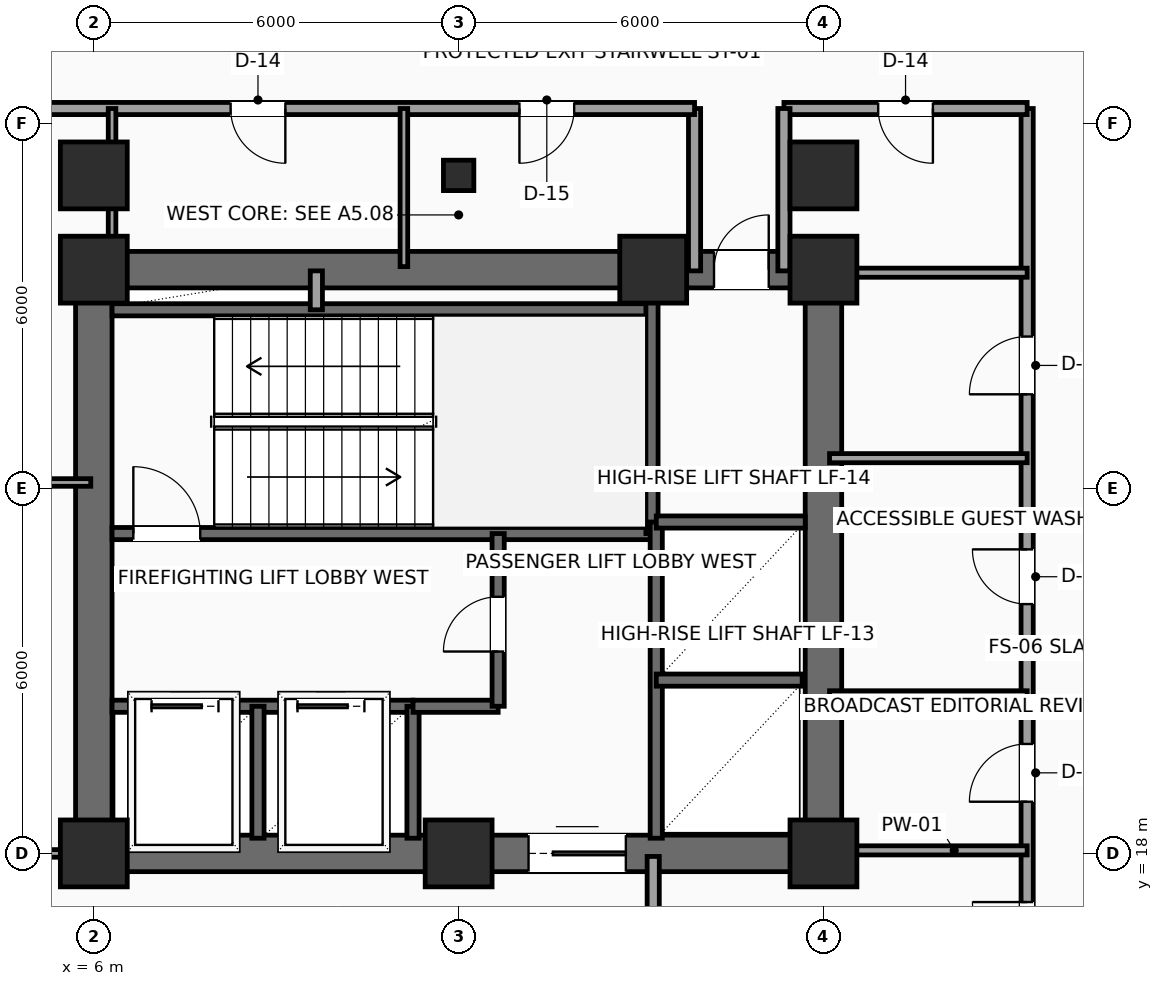
"""IFC4 building model, lengths in metres.
Left out: names, types, materials, properties, quantities, classifications, styles, units other than length and angle.
Written with IfcOpenShell. Run it as: python <this file> out.ifc"""

import sys

from ifc_helpers import new_model, si_unit, direction, frame, frame_2d, origin, origin_2d, place, context, subcontext, project, spatial, rectangle, hollow_rectangle, extrude, element, fill, save


model = new_model("IFC4")
c1 = context("Model", 3, precision=1e-05, world=origin(), true_north=direction((0.0, 1.0)))
c2 = subcontext(c1, "Body", "Model", "MODEL_VIEW")
j1 = project(units=[si_unit("LENGTHUNIT", "METRE"), si_unit("PLANEANGLEUNIT", "RADIAN")], contexts=[c1])
p1 = place(None, origin())
s1 = spatial("IfcSite", under=j1, at=p1, CompositionType="ELEMENT")
p2 = place(p1, origin())
s2 = spatial("IfcBuilding", under=s1, at=p2, CompositionType="ELEMENT")
p3 = place(p2, frame((0.0, 0.0, 153.15)))
s3 = spatial("IfcBuildingStorey", under=s2, at=p3, CompositionType="ELEMENT", Elevation=153.15)
for number, where, z_axis, x_axis in (
    (1, (6.0, 18.0, 0.0), (0.0, 0.0, 1.0), (1.0, 0.0, 0.0)),
    (2, (12.0, 18.0, 0.0), (0.0, 0.0, 1.0), (1.0, 0.0, 0.0)),
    (3, (18.0, 18.0, 0.0), (0.0, 0.0, 1.0), (1.0, 0.0, 0.0)),
    (4, (6.0, 27.6, 0.0), (0.0, 0.0, 1.0), (1.0, 0.0, 0.0)),
    (5, (15.2, 27.6, 0.0), (0.0, 0.0, 1.0), (1.0, 0.0, 0.0)),
    (6, (18.0, 27.6, 0.0), (0.0, 0.0, 1.0), (1.0, 0.0, 0.0)),
    (7, (6.0, 29.15, 0.0), (0.0, 0.0, 1.0), (1.0, 0.0, 0.0)),
):
    element("IfcColumn", number, at=place(p3, frame(where, z_axis=z_axis, x_axis=x_axis)), inside=s3, PredefinedType="COLUMN", context=c2, shape_type="SweptSolid", body=[
        extrude(rectangle(XDim=1.1, YDim=1.1, at=origin_2d()), origin(), (0.0, 0.0, 1.0), 3.75),
    ])
p4 = place(p3, frame((12.0, 29.15, 0.0), z_axis=(0.0, 0.0, 1.0), x_axis=(1.0, 0.0, 0.0)))
e8 = element("IfcColumn", 8, at=p4, inside=s3, PredefinedType="COLUMN", context=c2, shape_type="SweptSolid", body=[
    extrude(hollow_rectangle(XDim=0.5, YDim=0.5, WallThickness=0.025, InnerFilletRadius=0.025, OuterFilletRadius=0.04, at=origin_2d()), origin(), (0.0, 0.0, 1.0), 3.75),
])
p5 = place(p3, frame((18.0, 29.15, 0.0), z_axis=(0.0, 0.0, 1.0), x_axis=(1.0, 0.0, 0.0)))
e9 = element("IfcColumn", 9, at=p5, inside=s3, PredefinedType="COLUMN", context=c2, shape_type="SweptSolid", body=[
    extrude(rectangle(XDim=1.1, YDim=1.1, at=origin_2d()), origin(), (0.0, 0.0, 1.0), 3.75),
])
p6 = place(p3, frame((6.0, 18.0, 0.0), z_axis=(0.0, 0.0, 1.0), x_axis=(1.0, 0.0, 0.0)))
e10 = element("IfcWall", 10, at=p6, inside=s3, PredefinedType="SHEAR", context=c2, shape_type="SweptSolid", body=[
    extrude(rectangle(XDim=12.0, YDim=0.6, at=frame_2d((6.0, 0.0))), origin(), (0.0, 0.0, 1.0), 3.525),
])
p7 = place(p6, frame((7.15, 0.0, 0.0)))
e11 = element("IfcOpeningElement", 11, at=p7, cuts=e10, PredefinedType="OPENING", context=c2, shape_type="SweptSolid", body=[
    extrude(rectangle(XDim=1.6, YDim=2.3, at=frame_2d((0.8, 1.15))), frame((0.0, 0.31, 0.0), z_axis=(0.0, -1.0, 0.0), x_axis=(1.0, 0.0, 0.0)), (0.0, 0.0, 1.0), 0.62),
])
p8 = place(p3, frame((6.0, 27.6, 0.0), z_axis=(0.0, 0.0, 1.0), x_axis=(1.0, 0.0, 0.0)))
e12 = element("IfcWall", 12, at=p8, inside=s3, PredefinedType="SHEAR", context=c2, shape_type="SweptSolid", body=[
    extrude(rectangle(XDim=12.0, YDim=0.6, at=frame_2d((6.0, 0.0))), origin(), (0.0, 0.0, 1.0), 3.525),
])
p9 = place(p8, frame((10.2, 0.0, 0.0)))
e13 = element("IfcOpeningElement", 13, at=p9, cuts=e12, PredefinedType="OPENING", context=c2, shape_type="SweptSolid", body=[
    extrude(rectangle(XDim=0.9, YDim=2.15, at=frame_2d((0.45, 1.075))), frame((0.0, 0.31, 0.0), z_axis=(0.0, -1.0, 0.0), x_axis=(1.0, 0.0, 0.0)), (0.0, 0.0, 1.0), 0.62),
])
for number, where, z_axis, x_axis in (
    (14, (6.0, 18.0, 0.0), (0.0, 0.0, 1.0), (0.0, 1.0, 0.0)),
    (15, (18.0, 18.0, 0.0), (0.0, 0.0, 1.0), (0.0, 1.0, 0.0)),
):
    element("IfcWall", number, at=place(p3, frame(where, z_axis=z_axis, x_axis=x_axis)), inside=s3, PredefinedType="SHEAR", context=c2, shape_type="SweptSolid", body=[
        extrude(rectangle(XDim=9.6, YDim=0.6, at=frame_2d((4.8, 0.0))), origin(), (0.0, 0.0, 1.0), 3.525),
    ])
p10 = place(p3, frame((6.3, 23.26, 0.0), z_axis=(0.0, 0.0, 1.0), x_axis=(1.0, 0.0, 0.0)))
e16 = element("IfcWall", 16, at=p10, inside=s3, PredefinedType="SHEAR", context=c2, shape_type="SweptSolid", body=[
    extrude(rectangle(XDim=8.88, YDim=0.2, at=frame_2d((4.44, 0.0))), origin(), (0.0, 0.0, 1.0), 3.525),
])
p11 = place(p10, frame((0.35, 0.0, 0.0)))
e17 = element("IfcOpeningElement", 17, at=p11, cuts=e16, PredefinedType="OPENING", context=c2, shape_type="SweptSolid", body=[
    extrude(rectangle(XDim=1.1, YDim=2.2, at=frame_2d((0.55, 1.1))), frame((0.0, 0.11, 0.0), z_axis=(0.0, -1.0, 0.0), x_axis=(1.0, 0.0, 0.0)), (0.0, 0.0, 1.0), 0.22),
])
p12 = place(p3, frame((6.3, 26.94, 0.0), z_axis=(0.0, 0.0, 1.0), x_axis=(1.0, 0.0, 0.0)))
e18 = element("IfcWall", 18, at=p12, inside=s3, PredefinedType="SHEAR", context=c2, shape_type="SweptSolid", body=[
    extrude(rectangle(XDim=8.88, YDim=0.2, at=frame_2d((4.44, 0.0))), origin(), (0.0, 0.0, 1.0), 3.525),
])
p13 = place(p3, frame((15.18, 23.26, 0.0), z_axis=(0.0, 0.0, 1.0), x_axis=(0.0, 1.0, 0.0)))
e19 = element("IfcWall", 19, at=p13, inside=s3, PredefinedType="SHEAR", context=c2, shape_type="SweptSolid", body=[
    extrude(rectangle(XDim=4.04, YDim=0.2, at=frame_2d((2.02, 0.0))), origin(), (0.0, 0.0, 1.0), 3.525),
])
p14 = place(p3, frame((6.3, 20.42, 0.0), z_axis=(0.0, 0.0, 1.0), x_axis=(1.0, 0.0, 0.0)))
e20 = element("IfcWall", 20, at=p14, inside=s3, PredefinedType="SHEAR", context=c2, shape_type="SweptSolid", body=[
    extrude(rectangle(XDim=4.95, YDim=0.2, at=frame_2d((2.475, 0.0))), origin(), (0.0, 0.0, 1.0), 3.525),
])
p15 = place(p14, frame((0.65, 0.0, 0.0)))
e21 = element("IfcOpeningElement", 21, at=p15, cuts=e20, PredefinedType="OPENING", context=c2, shape_type="SweptSolid", body=[
    extrude(rectangle(XDim=1.1, YDim=2.2, at=frame_2d((0.55, 1.1))), frame((0.0, 0.11, 0.0), z_axis=(0.0, -1.0, 0.0), x_axis=(1.0, 0.0, 0.0)), (0.0, 0.0, 1.0), 0.22),
])
p16 = place(p14, frame((3.05, 0.0, 0.0)))
e22 = element("IfcOpeningElement", 22, at=p16, cuts=e20, PredefinedType="OPENING", context=c2, shape_type="SweptSolid", body=[
    extrude(rectangle(XDim=1.1, YDim=2.2, at=frame_2d((0.55, 1.1))), frame((0.0, 0.11, 0.0), z_axis=(0.0, -1.0, 0.0), x_axis=(1.0, 0.0, 0.0)), (0.0, 0.0, 1.0), 0.22),
])
for number, where, z_axis, x_axis in (
    (23, (8.7, 18.25, 0.0), (0.0, 0.0, 1.0), (0.0, 1.0, 0.0)),
    (24, (11.25, 18.25, 0.0), (0.0, 0.0, 1.0), (0.0, 1.0, 0.0)),
):
    element("IfcWall", number, at=place(p3, frame(where, z_axis=z_axis, x_axis=x_axis)), inside=s3, PredefinedType="SHEAR", context=c2, shape_type="SweptSolid", body=[
        extrude(rectangle(XDim=2.17, YDim=0.2, at=frame_2d((1.085, 0.0))), origin(), (0.0, 0.0, 1.0), 3.525),
    ])
p17 = place(p3, frame((11.25, 20.42, 0.0), z_axis=(0.0, 0.0, 1.0), x_axis=(1.0, 0.0, 0.0)))
e25 = element("IfcWall", 25, at=p17, inside=s3, PredefinedType="SHEAR", context=c2, shape_type="SweptSolid", body=[
    extrude(rectangle(XDim=1.4, YDim=0.2, at=frame_2d((0.7, 0.0))), origin(), (0.0, 0.0, 1.0), 3.525),
])
p18 = place(p3, frame((12.65, 20.42, 0.0), z_axis=(0.0, 0.0, 1.0), x_axis=(0.0, 1.0, 0.0)))
e26 = element("IfcWall", 26, at=p18, inside=s3, PredefinedType="SHEAR", context=c2, shape_type="SweptSolid", body=[
    extrude(rectangle(XDim=2.84, YDim=0.2, at=frame_2d((1.42, 0.0))), origin(), (0.0, 0.0, 1.0), 3.525),
])
p19 = place(p18, frame((0.9, 0.0, 0.0)))
e27 = element("IfcOpeningElement", 27, at=p19, cuts=e26, PredefinedType="OPENING", context=c2, shape_type="SweptSolid", body=[
    extrude(rectangle(XDim=0.9, YDim=2.15, at=frame_2d((0.45, 1.075))), frame((0.0, 0.11, 0.0), z_axis=(0.0, -1.0, 0.0), x_axis=(1.0, 0.0, 0.0)), (0.0, 0.0, 1.0), 0.22),
])
p20 = place(p3, frame((9.66, 26.94, 0.0), z_axis=(0.0, 0.0, 1.0), x_axis=(0.0, 1.0, 0.0)))
e28 = element("IfcWall", 28, at=p20, inside=s3, PredefinedType="SOLIDWALL", context=c2, shape_type="SweptSolid", body=[
    extrude(rectangle(XDim=0.64, YDim=0.2, at=frame_2d((0.32, 0.0))), origin(), (0.0, 0.0, 1.0), 3.525),
])
p21 = place(p3, frame((15.25, 18.25, 0.0), z_axis=(0.0, 0.0, 1.0), x_axis=(0.0, 1.0, 0.0)))
e29 = element("IfcWall", 29, at=p21, inside=s3, PredefinedType="SHEAR", context=c2, shape_type="SweptSolid", body=[
    extrude(rectangle(XDim=5.2, YDim=0.2, at=frame_2d((2.6, 0.0))), origin(), (0.0, 0.0, 1.0), 3.525),
])
p22 = place(p3, frame((15.25, 20.85, 0.0), z_axis=(0.0, 0.0, 1.0), x_axis=(1.0, 0.0, 0.0)))
e30 = element("IfcWall", 30, at=p22, inside=s3, PredefinedType="SHEAR", context=c2, shape_type="SweptSolid", body=[
    extrude(rectangle(XDim=2.4, YDim=0.2, at=frame_2d((1.2, 0.0))), origin(), (0.0, 0.0, 1.0), 3.525),
])
p23 = place(p3, frame((15.25, 23.45, 0.0), z_axis=(0.0, 0.0, 1.0), x_axis=(1.0, 0.0, 0.0)))
e31 = element("IfcWall", 31, at=p23, inside=s3, PredefinedType="SHEAR", context=c2, shape_type="SweptSolid", body=[
    extrude(rectangle(XDim=2.45, YDim=0.2, at=frame_2d((1.225, 0.0))), origin(), (0.0, 0.0, 1.0), 3.525),
])
p24 = place(p3, frame((15.2, 17.95, 0.0), z_axis=(0.0, 0.0, 1.0), x_axis=(0.0, -1.0, 0.0)))
e32 = element("IfcWall", 32, at=p24, inside=s3, PredefinedType="SOLIDWALL", context=c2, shape_type="SweptSolid", body=[
    extrude(rectangle(XDim=2.4, YDim=0.2, at=frame_2d((1.2, 0.0))), origin(), (0.0, 0.0, 1.0), 3.525),
])
p25 = place(p3, frame((21.35, 11.65, 0.0), z_axis=(0.0, 0.0, 1.0), x_axis=(0.0, 1.0, 0.0)))
e33 = element("IfcWall", 33, at=p25, inside=s3, PredefinedType="SOLIDWALL", context=c2, shape_type="SweptSolid", body=[
    extrude(rectangle(XDim=18.6, YDim=0.2, at=frame_2d((9.3, 0.0))), origin(), (0.0, 0.0, 1.0), 3.525),
])
p26 = place(p25, frame((7.2, 0.0, 0.0)))
e34 = element("IfcOpeningElement", 34, at=p26, cuts=e33, PredefinedType="OPENING", context=c2, shape_type="SweptSolid", body=[
    extrude(rectangle(XDim=0.95, YDim=2.15, at=frame_2d((0.475, 1.075))), frame((0.0, 0.11, 0.0), z_axis=(0.0, -1.0, 0.0), x_axis=(1.0, 0.0, 0.0)), (0.0, 0.0, 1.0), 0.22),
])
p27 = place(p25, frame((10.45, 0.0, 0.0)))
e35 = element("IfcOpeningElement", 35, at=p27, cuts=e33, PredefinedType="OPENING", context=c2, shape_type="SweptSolid", body=[
    extrude(rectangle(XDim=0.9, YDim=2.1, at=frame_2d((0.45, 1.05))), frame((0.0, 0.11, 0.0), z_axis=(0.0, -1.0, 0.0), x_axis=(1.0, 0.0, 0.0)), (0.0, 0.0, 1.0), 0.22),
])
p28 = place(p25, frame((13.9, 0.0, 0.0)))
e36 = element("IfcOpeningElement", 36, at=p28, cuts=e33, PredefinedType="OPENING", context=c2, shape_type="SweptSolid", body=[
    extrude(rectangle(XDim=0.95, YDim=2.15, at=frame_2d((0.475, 1.075))), frame((0.0, 0.11, 0.0), z_axis=(0.0, -1.0, 0.0), x_axis=(1.0, 0.0, 0.0)), (0.0, 0.0, 1.0), 0.22),
])
p29 = place(p25, frame((4.65, 0.0, 0.0)))
e37 = element("IfcOpeningElement", 37, at=p29, cuts=e33, PredefinedType="OPENING", context=c2, shape_type="SweptSolid", body=[
    extrude(rectangle(XDim=0.9, YDim=2.1, at=frame_2d((0.45, 1.05))), frame((0.0, 0.11, 0.0), z_axis=(0.0, -1.0, 0.0), x_axis=(1.0, 0.0, 0.0)), (0.0, 0.0, 1.0), 0.22),
])
p30 = place(p3, frame((21.35, 30.25, 0.0), z_axis=(0.0, 0.0, 1.0), x_axis=(-1.0, 0.0, 0.0)))
e38 = element("IfcWall", 38, at=p30, inside=s3, PredefinedType="SOLIDWALL", context=c2, shape_type="SweptSolid", body=[
    extrude(rectangle(XDim=4.0, YDim=0.2, at=frame_2d((2.0, 0.0))), origin(), (0.0, 0.0, 1.0), 3.525),
])
p31 = place(p30, frame((1.55, 0.0, 0.0)))
e39 = element("IfcOpeningElement", 39, at=p31, cuts=e38, PredefinedType="OPENING", context=c2, shape_type="SweptSolid", body=[
    extrude(rectangle(XDim=0.9, YDim=2.1, at=frame_2d((0.45, 1.05))), frame((0.0, 0.11, 0.0), z_axis=(0.0, -1.0, 0.0), x_axis=(1.0, 0.0, 0.0)), (0.0, 0.0, 1.0), 0.22),
])
for number, where, z_axis, x_axis in (
    (40, (17.35, 30.25, 0.0), (0.0, 0.0, 1.0), (0.0, -1.0, 0.0)),
    (41, (15.88, 27.58, 0.0), (0.0, 0.0, 1.0), (0.0, 1.0, 0.0)),
):
    element("IfcWall", number, at=place(p3, frame(where, z_axis=z_axis, x_axis=x_axis)), inside=s3, PredefinedType="SOLIDWALL", context=c2, shape_type="SweptSolid", body=[
        extrude(rectangle(XDim=2.67, YDim=0.2, at=frame_2d((1.335, 0.0))), origin(), (0.0, 0.0, 1.0), 3.525),
    ])
p32 = place(p3, frame((15.88, 30.25, 0.0), z_axis=(0.0, 0.0, 1.0), x_axis=(-1.0, 0.0, 0.0)))
e42 = element("IfcWall", 42, at=p32, inside=s3, PredefinedType="SOLIDWALL", context=c2, shape_type="SweptSolid", body=[
    extrude(rectangle(XDim=15.58, YDim=0.2, at=frame_2d((7.79, 0.0))), origin(), (0.0, 0.0, 1.0), 3.525),
])
p33 = place(p32, frame((12.28, 0.0, 0.0)))
e43 = element("IfcOpeningElement", 43, at=p33, cuts=e42, PredefinedType="OPENING", context=c2, shape_type="SweptSolid", body=[
    extrude(rectangle(XDim=0.9, YDim=2.1, at=frame_2d((0.45, 1.05))), frame((0.0, 0.11, 0.0), z_axis=(0.0, -1.0, 0.0), x_axis=(1.0, 0.0, 0.0)), (0.0, 0.0, 1.0), 0.22),
])
p34 = place(p32, frame((6.73, 0.0, 0.0)))
e44 = element("IfcOpeningElement", 44, at=p34, cuts=e42, PredefinedType="OPENING", context=c2, shape_type="SweptSolid", body=[
    extrude(rectangle(XDim=0.9, YDim=2.1, at=frame_2d((0.45, 1.05))), frame((0.0, 0.11, 0.0), z_axis=(0.0, -1.0, 0.0), x_axis=(1.0, 0.0, 0.0)), (0.0, 0.0, 1.0), 0.22),
])
p35 = place(p32, frame((1.98, 0.0, 0.0)))
e45 = element("IfcOpeningElement", 45, at=p35, cuts=e42, PredefinedType="OPENING", context=c2, shape_type="SweptSolid", body=[
    extrude(rectangle(XDim=0.9, YDim=2.1, at=frame_2d((0.45, 1.05))), frame((0.0, 0.11, 0.0), z_axis=(0.0, -1.0, 0.0), x_axis=(1.0, 0.0, 0.0)), (0.0, 0.0, 1.0), 0.22),
])
p36 = place(p3, frame((18.1, 18.05, 0.0), z_axis=(0.0, 0.0, 1.0), x_axis=(1.0, 0.0, 0.0)))
e46 = element("IfcWall", 46, at=p36, inside=s3, PredefinedType="PARTITIONING", context=c2, shape_type="SweptSolid", body=[
    extrude(rectangle(XDim=3.25, YDim=0.15, at=frame_2d((1.625, 0.0))), origin(), (0.0, 0.0, 1.0), 3.017),
])
for number, where, z_axis, x_axis in (
    (47, (18.1, 20.6, 0.0), (0.0, 0.0, 1.0), (1.0, 0.0, 0.0)),
    (48, (18.1, 24.5, 0.0), (0.0, 0.0, 1.0), (1.0, 0.0, 0.0)),
    (49, (18.1, 27.55, 0.0), (0.0, 0.0, 1.0), (1.0, 0.0, 0.0)),
):
    element("IfcWall", number, at=place(p3, frame(where, z_axis=z_axis, x_axis=x_axis)), inside=s3, PredefinedType="PARTITIONING", context=c2, shape_type="SweptSolid", body=[
        extrude(rectangle(XDim=3.25, YDim=0.15, at=frame_2d((1.625, 0.0))), origin(), (0.0, 0.0, 1.0), 3.525),
    ])
p37 = place(p3, frame((0.3, 18.0, 0.0), z_axis=(0.0, 0.0, 1.0), x_axis=(1.0, 0.0, 0.0)))
e50 = element("IfcWall", 50, at=p37, inside=s3, PredefinedType="PARTITIONING", context=c2, shape_type="SweptSolid", body=[
    extrude(rectangle(XDim=5.65, YDim=0.125, at=frame_2d((2.825, 0.0))), origin(), (0.0, 0.0, 1.0), 3.017),
])
p38 = place(p37, frame((2.4, 0.0, 0.0)))
e51 = element("IfcOpeningElement", 51, at=p38, cuts=e50, PredefinedType="OPENING", context=c2, shape_type="SweptSolid", body=[
    extrude(rectangle(XDim=0.9, YDim=2.1, at=frame_2d((0.45, 1.05))), frame((0.0, 0.073, 0.0), z_axis=(0.0, -1.0, 0.0), x_axis=(1.0, 0.0, 0.0)), (0.0, 0.0, 1.0), 0.145),
])
p39 = place(p3, frame((0.3, 24.1, 0.0), z_axis=(0.0, 0.0, 1.0), x_axis=(1.0, 0.0, 0.0)))
e52 = element("IfcWall", 52, at=p39, inside=s3, PredefinedType="PARTITIONING", context=c2, shape_type="SweptSolid", body=[
    extrude(rectangle(XDim=5.65, YDim=0.125, at=frame_2d((2.825, 0.0))), origin(), (0.0, 0.0, 1.0), 3.525),
])
for number, where, z_axis, x_axis in (
    (53, (6.3, 27.65, 0.0), (0.0, 0.0, 1.0), (0.0, 1.0, 0.0)),
    (54, (11.1, 27.65, 0.0), (0.0, 0.0, 1.0), (0.0, 1.0, 0.0)),
):
    element("IfcWall", number, at=place(p3, frame(where, z_axis=z_axis, x_axis=x_axis)), inside=s3, PredefinedType="PARTITIONING", context=c2, shape_type="SweptSolid", body=[
        extrude(rectangle(XDim=2.6, YDim=0.125, at=frame_2d((1.3, 0.0))), origin(), (0.0, 0.0, 1.0), 3.525),
    ])
p40 = place(p7, origin())
e55 = element("IfcDoor", 55, at=p40, inside=s3, OperationType="DOUBLE_DOOR_SLIDING", PredefinedType="DOOR", context=c2, shape_type="SweptSolid", body=[
    extrude(rectangle(XDim=1.6, YDim=2.3, at=frame_2d((0.8, 1.15))), frame((0.0, 0.025, 0.0), z_axis=(0.0, -1.0, 0.0), x_axis=(1.0, 0.0, 0.0)), (0.0, 0.0, 1.0), 0.05),
])
fill(e11, e55)
p41 = place(p9, origin())
e56 = element("IfcDoor", 56, at=p41, inside=s3, OperationType="SINGLE_SWING_RIGHT", PredefinedType="DOOR", context=c2, shape_type="SweptSolid", body=[
    extrude(rectangle(XDim=0.9, YDim=2.15, at=frame_2d((0.45, 1.075))), frame((0.0, 0.025, 0.0), z_axis=(0.0, -1.0, 0.0), x_axis=(1.0, 0.0, 0.0)), (0.0, 0.0, 1.0), 0.05),
])
fill(e13, e56)
p42 = place(p11, origin())
e57 = element("IfcDoor", 57, at=p42, inside=s3, OperationType="SINGLE_SWING_LEFT", PredefinedType="DOOR", context=c2, shape_type="SweptSolid", body=[
    extrude(rectangle(XDim=1.1, YDim=2.2, at=frame_2d((0.55, 1.1))), frame((0.0, 0.025, 0.0), z_axis=(0.0, -1.0, 0.0), x_axis=(1.0, 0.0, 0.0)), (0.0, 0.0, 1.0), 0.05),
])
fill(e17, e57)
p43 = place(p15, origin())
e58 = element("IfcDoor", 58, at=p43, inside=s3, OperationType="SLIDING_TO_LEFT", PredefinedType="DOOR", context=c2, shape_type="SweptSolid", body=[
    extrude(rectangle(XDim=1.1, YDim=2.2, at=frame_2d((0.55, 1.1))), frame((0.0, 0.025, 0.0), z_axis=(0.0, -1.0, 0.0), x_axis=(1.0, 0.0, 0.0)), (0.0, 0.0, 1.0), 0.05),
])
fill(e21, e58)
p44 = place(p16, origin())
e59 = element("IfcDoor", 59, at=p44, inside=s3, OperationType="SLIDING_TO_LEFT", PredefinedType="DOOR", context=c2, shape_type="SweptSolid", body=[
    extrude(rectangle(XDim=1.1, YDim=2.2, at=frame_2d((0.55, 1.1))), frame((0.0, 0.025, 0.0), z_axis=(0.0, -1.0, 0.0), x_axis=(1.0, 0.0, 0.0)), (0.0, 0.0, 1.0), 0.05),
])
fill(e22, e59)
p45 = place(p19, origin())
e60 = element("IfcDoor", 60, at=p45, inside=s3, OperationType="SINGLE_SWING_LEFT", PredefinedType="DOOR", context=c2, shape_type="SweptSolid", body=[
    extrude(rectangle(XDim=0.9, YDim=2.15, at=frame_2d((0.45, 1.075))), frame((0.0, 0.025, 0.0), z_axis=(0.0, -1.0, 0.0), x_axis=(1.0, 0.0, 0.0)), (0.0, 0.0, 1.0), 0.05),
])
fill(e27, e60)
p46 = place(p26, origin())
e61 = element("IfcDoor", 61, at=p46, inside=s3, OperationType="SINGLE_SWING_LEFT", PredefinedType="DOOR", context=c2, shape_type="SweptSolid", body=[
    extrude(rectangle(XDim=0.95, YDim=2.15, at=frame_2d((0.475, 1.075))), frame((0.0, 0.025, 0.0), z_axis=(0.0, -1.0, 0.0), x_axis=(1.0, 0.0, 0.0)), (0.0, 0.0, 1.0), 0.05),
])
fill(e34, e61)
p47 = place(p27, origin())
e62 = element("IfcDoor", 62, at=p47, inside=s3, OperationType="SINGLE_SWING_RIGHT", PredefinedType="DOOR", context=c2, shape_type="SweptSolid", body=[
    extrude(rectangle(XDim=0.9, YDim=2.1, at=frame_2d((0.45, 1.05))), frame((0.0, 0.025, 0.0), z_axis=(0.0, -1.0, 0.0), x_axis=(1.0, 0.0, 0.0)), (0.0, 0.0, 1.0), 0.05),
])
fill(e35, e62)
p48 = place(p28, origin())
e63 = element("IfcDoor", 63, at=p48, inside=s3, OperationType="SINGLE_SWING_LEFT", PredefinedType="DOOR", context=c2, shape_type="SweptSolid", body=[
    extrude(rectangle(XDim=0.95, YDim=2.15, at=frame_2d((0.475, 1.075))), frame((0.0, 0.025, 0.0), z_axis=(0.0, -1.0, 0.0), x_axis=(1.0, 0.0, 0.0)), (0.0, 0.0, 1.0), 0.05),
])
fill(e36, e63)
p49 = place(p29, origin())
e64 = element("IfcDoor", 64, at=p49, inside=s3, OperationType="SINGLE_SWING_RIGHT", PredefinedType="DOOR", context=c2, shape_type="SweptSolid", body=[
    extrude(rectangle(XDim=0.9, YDim=2.1, at=frame_2d((0.45, 1.05))), frame((0.0, 0.025, 0.0), z_axis=(0.0, -1.0, 0.0), x_axis=(1.0, 0.0, 0.0)), (0.0, 0.0, 1.0), 0.05),
])
fill(e37, e64)
p50 = place(p31, origin())
e65 = element("IfcDoor", 65, at=p50, inside=s3, OperationType="SINGLE_SWING_LEFT", PredefinedType="DOOR", context=c2, shape_type="SweptSolid", body=[
    extrude(rectangle(XDim=0.9, YDim=2.1, at=frame_2d((0.45, 1.05))), frame((0.0, 0.025, 0.0), z_axis=(0.0, -1.0, 0.0), x_axis=(1.0, 0.0, 0.0)), (0.0, 0.0, 1.0), 0.05),
])
fill(e39, e65)
p51 = place(p34, origin())
e66 = element("IfcDoor", 66, at=p51, inside=s3, OperationType="SINGLE_SWING_LEFT", PredefinedType="DOOR", context=c2, shape_type="SweptSolid", body=[
    extrude(rectangle(XDim=0.9, YDim=2.1, at=frame_2d((0.45, 1.05))), frame((0.0, 0.025, 0.0), z_axis=(0.0, -1.0, 0.0), x_axis=(1.0, 0.0, 0.0)), (0.0, 0.0, 1.0), 0.05),
])
fill(e44, e66)
p52 = place(p35, origin())
e67 = element("IfcDoor", 67, at=p52, inside=s3, OperationType="SINGLE_SWING_RIGHT", PredefinedType="DOOR", context=c2, shape_type="SweptSolid", body=[
    extrude(rectangle(XDim=0.9, YDim=2.1, at=frame_2d((0.45, 1.05))), frame((0.0, 0.025, 0.0), z_axis=(0.0, -1.0, 0.0), x_axis=(1.0, 0.0, 0.0)), (0.0, 0.0, 1.0), 0.05),
])
fill(e45, e67)
save(model, sys.argv[1])
